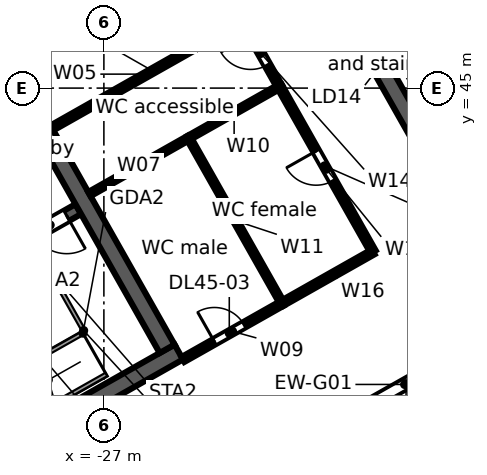
"""IFC4 building model, lengths in metres.
Left out: names, types, materials, properties, quantities, classifications, styles, units other than length and angle.
Written with IfcOpenShell. Run it as: python <this file> out.ifc"""

import sys

from ifc_helpers import new_model, si_unit, direction, frame, frame_2d, origin, place, context, subcontext, project, spatial, rectangle, extrude, element, fill, save


model = new_model("IFC4")
c1 = context("Model", 3, precision=1e-05, world=origin(), true_north=direction((0.0, 1.0)))
c2 = subcontext(c1, "Body", "Model", "MODEL_VIEW")
j1 = project(units=[si_unit("LENGTHUNIT", "METRE"), si_unit("PLANEANGLEUNIT", "RADIAN")], contexts=[c1])
p1 = place(None, origin())
s1 = spatial("IfcSite", under=j1, at=p1, CompositionType="ELEMENT")
p2 = place(p1, origin())
s2 = spatial("IfcBuilding", under=s1, at=p2, CompositionType="ELEMENT")
p3 = place(p2, frame((0.0, 0.0, 211.4)))
s3 = spatial("IfcBuildingStorey", under=s2, at=p3, CompositionType="ELEMENT", Elevation=211.4)
p4 = place(p3, frame((-0.046, 47.974, 0.0), z_axis=(0.0, 0.0, 1.0), x_axis=(-0.870356579543, -0.492421998337, 0.0)))
e1 = element("IfcWall", 1, at=p4, inside=s3, PredefinedType="STANDARD", context=c2, shape_type="SweptSolid", body=[
    extrude(rectangle(XDim=43.754, YDim=0.25, at=frame_2d((21.877, 0.0))), origin(), (0.0, 0.0, 1.0), 3.62),
])
p5 = place(p4, frame((41.061, 0.0, 0.8)))
e2 = element("IfcOpeningElement", 2, at=p5, cuts=e1, PredefinedType="OPENING", context=c2, shape_type="SweptSolid", body=[
    extrude(rectangle(XDim=2.4, YDim=2.2, at=frame_2d((1.2, 1.1))), frame((0.0, 0.135, 0.0), z_axis=(0.0, -1.0, 0.0), x_axis=(1.0, 0.0, 0.0)), (0.0, 0.0, 1.0), 0.27),
])
p6 = place(p4, frame((38.443, 0.0, 0.0)))
e3 = element("IfcOpeningElement", 3, at=p6, cuts=e1, PredefinedType="OPENING", context=c2, shape_type="SweptSolid", body=[
    extrude(rectangle(XDim=1.8, YDim=2.4, at=frame_2d((0.9, 1.2))), frame((0.0, 0.135, 0.0), z_axis=(0.0, -1.0, 0.0), x_axis=(1.0, 0.0, 0.0)), (0.0, 0.0, 1.0), 0.27),
])
p7 = place(p4, frame((35.225, 0.0, 0.8)))
e4 = element("IfcOpeningElement", 4, at=p7, cuts=e1, PredefinedType="OPENING", context=c2, shape_type="SweptSolid", body=[
    extrude(rectangle(XDim=2.4, YDim=2.2, at=frame_2d((1.2, 1.1))), frame((0.0, 0.135, 0.0), z_axis=(0.0, -1.0, 0.0), x_axis=(1.0, 0.0, 0.0)), (0.0, 0.0, 1.0), 0.27),
])
p8 = place(p4, frame((32.307, 0.0, 0.8)))
e5 = element("IfcOpeningElement", 5, at=p8, cuts=e1, PredefinedType="OPENING", context=c2, shape_type="SweptSolid", body=[
    extrude(rectangle(XDim=2.4, YDim=2.2, at=frame_2d((1.2, 1.1))), frame((0.0, 0.135, 0.0), z_axis=(0.0, -1.0, 0.0), x_axis=(1.0, 0.0, 0.0)), (0.0, 0.0, 1.0), 0.27),
])
p9 = place(p4, frame((29.688, 0.0, 0.0)))
e6 = element("IfcOpeningElement", 6, at=p9, cuts=e1, PredefinedType="OPENING", context=c2, shape_type="SweptSolid", body=[
    extrude(rectangle(XDim=1.8, YDim=2.4, at=frame_2d((0.9, 1.2))), frame((0.0, 0.135, 0.0), z_axis=(0.0, -1.0, 0.0), x_axis=(1.0, 0.0, 0.0)), (0.0, 0.0, 1.0), 0.27),
])
p10 = place(p4, frame((26.47, 0.0, 0.8)))
e7 = element("IfcOpeningElement", 7, at=p10, cuts=e1, PredefinedType="OPENING", context=c2, shape_type="SweptSolid", body=[
    extrude(rectangle(XDim=2.4, YDim=2.2, at=frame_2d((1.2, 1.1))), frame((0.0, 0.135, 0.0), z_axis=(0.0, -1.0, 0.0), x_axis=(1.0, 0.0, 0.0)), (0.0, 0.0, 1.0), 0.27),
])
p11 = place(p4, frame((23.552, 0.0, 0.8)))
e8 = element("IfcOpeningElement", 8, at=p11, cuts=e1, PredefinedType="OPENING", context=c2, shape_type="SweptSolid", body=[
    extrude(rectangle(XDim=2.4, YDim=2.2, at=frame_2d((1.2, 1.1))), frame((0.0, 0.135, 0.0), z_axis=(0.0, -1.0, 0.0), x_axis=(1.0, 0.0, 0.0)), (0.0, 0.0, 1.0), 0.27),
])
p12 = place(p4, frame((20.934, 0.0, 0.0)))
e9 = element("IfcOpeningElement", 9, at=p12, cuts=e1, PredefinedType="OPENING", context=c2, shape_type="SweptSolid", body=[
    extrude(rectangle(XDim=1.8, YDim=2.4, at=frame_2d((0.9, 1.2))), frame((0.0, 0.135, 0.0), z_axis=(0.0, -1.0, 0.0), x_axis=(1.0, 0.0, 0.0)), (0.0, 0.0, 1.0), 0.27),
])
p13 = place(p4, frame((17.716, 0.0, 0.8)))
e10 = element("IfcOpeningElement", 10, at=p13, cuts=e1, PredefinedType="OPENING", context=c2, shape_type="SweptSolid", body=[
    extrude(rectangle(XDim=2.4, YDim=2.2, at=frame_2d((1.2, 1.1))), frame((0.0, 0.135, 0.0), z_axis=(0.0, -1.0, 0.0), x_axis=(1.0, 0.0, 0.0)), (0.0, 0.0, 1.0), 0.27),
])
p14 = place(p4, frame((14.798, 0.0, 0.8)))
e11 = element("IfcOpeningElement", 11, at=p14, cuts=e1, PredefinedType="OPENING", context=c2, shape_type="SweptSolid", body=[
    extrude(rectangle(XDim=2.4, YDim=2.2, at=frame_2d((1.2, 1.1))), frame((0.0, 0.135, 0.0), z_axis=(0.0, -1.0, 0.0), x_axis=(1.0, 0.0, 0.0)), (0.0, 0.0, 1.0), 0.27),
])
p15 = place(p4, frame((12.179, 0.0, 0.0)))
e12 = element("IfcOpeningElement", 12, at=p15, cuts=e1, PredefinedType="OPENING", context=c2, shape_type="SweptSolid", body=[
    extrude(rectangle(XDim=1.8, YDim=2.4, at=frame_2d((0.9, 1.2))), frame((0.0, 0.135, 0.0), z_axis=(0.0, -1.0, 0.0), x_axis=(1.0, 0.0, 0.0)), (0.0, 0.0, 1.0), 0.27),
])
p16 = place(p4, frame((8.961, 0.0, 0.8)))
e13 = element("IfcOpeningElement", 13, at=p16, cuts=e1, PredefinedType="OPENING", context=c2, shape_type="SweptSolid", body=[
    extrude(rectangle(XDim=2.4, YDim=2.2, at=frame_2d((1.2, 1.1))), frame((0.0, 0.135, 0.0), z_axis=(0.0, -1.0, 0.0), x_axis=(1.0, 0.0, 0.0)), (0.0, 0.0, 1.0), 0.27),
])
p17 = place(p4, frame((6.043, 0.0, 0.8)))
e14 = element("IfcOpeningElement", 14, at=p17, cuts=e1, PredefinedType="OPENING", context=c2, shape_type="SweptSolid", body=[
    extrude(rectangle(XDim=2.4, YDim=2.2, at=frame_2d((1.2, 1.1))), frame((0.0, 0.135, 0.0), z_axis=(0.0, -1.0, 0.0), x_axis=(1.0, 0.0, 0.0)), (0.0, 0.0, 1.0), 0.27),
])
p18 = place(p4, frame((3.425, 0.0, 0.0)))
e15 = element("IfcOpeningElement", 15, at=p18, cuts=e1, PredefinedType="OPENING", context=c2, shape_type="SweptSolid", body=[
    extrude(rectangle(XDim=1.8, YDim=2.4, at=frame_2d((0.9, 1.2))), frame((0.0, 0.135, 0.0), z_axis=(0.0, -1.0, 0.0), x_axis=(1.0, 0.0, 0.0)), (0.0, 0.0, 1.0), 0.27),
])
p19 = place(p4, frame((0.207, 0.0, 0.8)))
e16 = element("IfcOpeningElement", 16, at=p19, cuts=e1, PredefinedType="OPENING", context=c2, shape_type="SweptSolid", body=[
    extrude(rectangle(XDim=2.4, YDim=2.2, at=frame_2d((1.2, 1.1))), frame((0.0, 0.135, 0.0), z_axis=(0.0, -1.0, 0.0), x_axis=(1.0, 0.0, 0.0)), (0.0, 0.0, 1.0), 0.27),
])
p20 = place(p3, frame((-58.732, 38.771, 0.0), z_axis=(0.0, 0.0, 1.0), x_axis=(0.870354824205, 0.492425100887, 0.0)))
e17 = element("IfcWall", 17, at=p20, inside=s3, PredefinedType="STANDARD", context=c2, shape_type="SweptSolid", body=[
    extrude(rectangle(XDim=64.006, YDim=0.25, at=frame_2d((32.003, 0.0))), origin(), (0.0, 0.0, 1.0), 3.62),
])
p21 = place(p20, frame((61.259, 0.0, 0.8)))
e18 = element("IfcOpeningElement", 18, at=p21, cuts=e17, PredefinedType="OPENING", context=c2, shape_type="SweptSolid", body=[
    extrude(rectangle(XDim=2.4, YDim=2.2, at=frame_2d((1.2, 1.1))), frame((0.0, 0.135, 0.0), z_axis=(0.0, -1.0, 0.0), x_axis=(1.0, 0.0, 0.0)), (0.0, 0.0, 1.0), 0.27),
])
p22 = place(p20, frame((58.216, 0.0, 0.8)))
e19 = element("IfcOpeningElement", 19, at=p22, cuts=e17, PredefinedType="OPENING", context=c2, shape_type="SweptSolid", body=[
    extrude(rectangle(XDim=2.4, YDim=2.2, at=frame_2d((1.2, 1.1))), frame((0.0, 0.135, 0.0), z_axis=(0.0, -1.0, 0.0), x_axis=(1.0, 0.0, 0.0)), (0.0, 0.0, 1.0), 0.27),
])
p23 = place(p20, frame((55.173, 0.0, 0.8)))
e20 = element("IfcOpeningElement", 20, at=p23, cuts=e17, PredefinedType="OPENING", context=c2, shape_type="SweptSolid", body=[
    extrude(rectangle(XDim=2.4, YDim=2.2, at=frame_2d((1.2, 1.1))), frame((0.0, 0.135, 0.0), z_axis=(0.0, -1.0, 0.0), x_axis=(1.0, 0.0, 0.0)), (0.0, 0.0, 1.0), 0.27),
])
p24 = place(p20, frame((52.129, 0.0, 0.8)))
e21 = element("IfcOpeningElement", 21, at=p24, cuts=e17, PredefinedType="OPENING", context=c2, shape_type="SweptSolid", body=[
    extrude(rectangle(XDim=2.4, YDim=2.2, at=frame_2d((1.2, 1.1))), frame((0.0, 0.135, 0.0), z_axis=(0.0, -1.0, 0.0), x_axis=(1.0, 0.0, 0.0)), (0.0, 0.0, 1.0), 0.27),
])
p25 = place(p20, frame((49.086, 0.0, 0.8)))
e22 = element("IfcOpeningElement", 22, at=p25, cuts=e17, PredefinedType="OPENING", context=c2, shape_type="SweptSolid", body=[
    extrude(rectangle(XDim=2.4, YDim=2.2, at=frame_2d((1.2, 1.1))), frame((0.0, 0.135, 0.0), z_axis=(0.0, -1.0, 0.0), x_axis=(1.0, 0.0, 0.0)), (0.0, 0.0, 1.0), 0.27),
])
p26 = place(p20, frame((46.043, 0.0, 0.8)))
e23 = element("IfcOpeningElement", 23, at=p26, cuts=e17, PredefinedType="OPENING", context=c2, shape_type="SweptSolid", body=[
    extrude(rectangle(XDim=2.4, YDim=2.2, at=frame_2d((1.2, 1.1))), frame((0.0, 0.135, 0.0), z_axis=(0.0, -1.0, 0.0), x_axis=(1.0, 0.0, 0.0)), (0.0, 0.0, 1.0), 0.27),
])
p27 = place(p20, frame((43.0, 0.0, 0.8)))
e24 = element("IfcOpeningElement", 24, at=p27, cuts=e17, PredefinedType="OPENING", context=c2, shape_type="SweptSolid", body=[
    extrude(rectangle(XDim=2.4, YDim=2.2, at=frame_2d((1.2, 1.1))), frame((0.0, 0.135, 0.0), z_axis=(0.0, -1.0, 0.0), x_axis=(1.0, 0.0, 0.0)), (0.0, 0.0, 1.0), 0.27),
])
p28 = place(p20, frame((39.956, 0.0, 0.8)))
e25 = element("IfcOpeningElement", 25, at=p28, cuts=e17, PredefinedType="OPENING", context=c2, shape_type="SweptSolid", body=[
    extrude(rectangle(XDim=2.4, YDim=2.2, at=frame_2d((1.2, 1.1))), frame((0.0, 0.135, 0.0), z_axis=(0.0, -1.0, 0.0), x_axis=(1.0, 0.0, 0.0)), (0.0, 0.0, 1.0), 0.27),
])
p29 = place(p20, frame((36.913, 0.0, 0.8)))
e26 = element("IfcOpeningElement", 26, at=p29, cuts=e17, PredefinedType="OPENING", context=c2, shape_type="SweptSolid", body=[
    extrude(rectangle(XDim=2.4, YDim=2.2, at=frame_2d((1.2, 1.1))), frame((0.0, 0.135, 0.0), z_axis=(0.0, -1.0, 0.0), x_axis=(1.0, 0.0, 0.0)), (0.0, 0.0, 1.0), 0.27),
])
p30 = place(p20, frame((33.87, 0.0, 0.8)))
e27 = element("IfcOpeningElement", 27, at=p30, cuts=e17, PredefinedType="OPENING", context=c2, shape_type="SweptSolid", body=[
    extrude(rectangle(XDim=2.4, YDim=2.2, at=frame_2d((1.2, 1.1))), frame((0.0, 0.135, 0.0), z_axis=(0.0, -1.0, 0.0), x_axis=(1.0, 0.0, 0.0)), (0.0, 0.0, 1.0), 0.27),
])
p31 = place(p20, frame((30.826, 0.0, 0.8)))
e28 = element("IfcOpeningElement", 28, at=p31, cuts=e17, PredefinedType="OPENING", context=c2, shape_type="SweptSolid", body=[
    extrude(rectangle(XDim=2.4, YDim=2.2, at=frame_2d((1.2, 1.1))), frame((0.0, 0.135, 0.0), z_axis=(0.0, -1.0, 0.0), x_axis=(1.0, 0.0, 0.0)), (0.0, 0.0, 1.0), 0.27),
])
p32 = place(p20, frame((27.783, 0.0, 0.8)))
e29 = element("IfcOpeningElement", 29, at=p32, cuts=e17, PredefinedType="OPENING", context=c2, shape_type="SweptSolid", body=[
    extrude(rectangle(XDim=2.4, YDim=2.2, at=frame_2d((1.2, 1.1))), frame((0.0, 0.135, 0.0), z_axis=(0.0, -1.0, 0.0), x_axis=(1.0, 0.0, 0.0)), (0.0, 0.0, 1.0), 0.27),
])
p33 = place(p20, frame((24.74, 0.0, 0.8)))
e30 = element("IfcOpeningElement", 30, at=p33, cuts=e17, PredefinedType="OPENING", context=c2, shape_type="SweptSolid", body=[
    extrude(rectangle(XDim=2.4, YDim=2.2, at=frame_2d((1.2, 1.1))), frame((0.0, 0.135, 0.0), z_axis=(0.0, -1.0, 0.0), x_axis=(1.0, 0.0, 0.0)), (0.0, 0.0, 1.0), 0.27),
])
p34 = place(p20, frame((21.696, 0.0, 0.8)))
e31 = element("IfcOpeningElement", 31, at=p34, cuts=e17, PredefinedType="OPENING", context=c2, shape_type="SweptSolid", body=[
    extrude(rectangle(XDim=2.4, YDim=2.2, at=frame_2d((1.2, 1.1))), frame((0.0, 0.135, 0.0), z_axis=(0.0, -1.0, 0.0), x_axis=(1.0, 0.0, 0.0)), (0.0, 0.0, 1.0), 0.27),
])
p35 = place(p20, frame((18.653, 0.0, 0.8)))
e32 = element("IfcOpeningElement", 32, at=p35, cuts=e17, PredefinedType="OPENING", context=c2, shape_type="SweptSolid", body=[
    extrude(rectangle(XDim=2.4, YDim=2.2, at=frame_2d((1.2, 1.1))), frame((0.0, 0.135, 0.0), z_axis=(0.0, -1.0, 0.0), x_axis=(1.0, 0.0, 0.0)), (0.0, 0.0, 1.0), 0.27),
])
p36 = place(p20, frame((15.61, 0.0, 0.8)))
e33 = element("IfcOpeningElement", 33, at=p36, cuts=e17, PredefinedType="OPENING", context=c2, shape_type="SweptSolid", body=[
    extrude(rectangle(XDim=2.4, YDim=2.2, at=frame_2d((1.2, 1.1))), frame((0.0, 0.135, 0.0), z_axis=(0.0, -1.0, 0.0), x_axis=(1.0, 0.0, 0.0)), (0.0, 0.0, 1.0), 0.27),
])
p37 = place(p20, frame((12.567, 0.0, 0.8)))
e34 = element("IfcOpeningElement", 34, at=p37, cuts=e17, PredefinedType="OPENING", context=c2, shape_type="SweptSolid", body=[
    extrude(rectangle(XDim=2.4, YDim=2.2, at=frame_2d((1.2, 1.1))), frame((0.0, 0.135, 0.0), z_axis=(0.0, -1.0, 0.0), x_axis=(1.0, 0.0, 0.0)), (0.0, 0.0, 1.0), 0.27),
])
p38 = place(p20, frame((9.523, 0.0, 0.8)))
e35 = element("IfcOpeningElement", 35, at=p38, cuts=e17, PredefinedType="OPENING", context=c2, shape_type="SweptSolid", body=[
    extrude(rectangle(XDim=2.4, YDim=2.2, at=frame_2d((1.2, 1.1))), frame((0.0, 0.135, 0.0), z_axis=(0.0, -1.0, 0.0), x_axis=(1.0, 0.0, 0.0)), (0.0, 0.0, 1.0), 0.27),
])
p39 = place(p20, frame((6.48, 0.0, 0.8)))
e36 = element("IfcOpeningElement", 36, at=p39, cuts=e17, PredefinedType="OPENING", context=c2, shape_type="SweptSolid", body=[
    extrude(rectangle(XDim=2.4, YDim=2.2, at=frame_2d((1.2, 1.1))), frame((0.0, 0.135, 0.0), z_axis=(0.0, -1.0, 0.0), x_axis=(1.0, 0.0, 0.0)), (0.0, 0.0, 1.0), 0.27),
])
p40 = place(p20, frame((3.437, 0.0, 0.8)))
e37 = element("IfcOpeningElement", 37, at=p40, cuts=e17, PredefinedType="OPENING", context=c2, shape_type="SweptSolid", body=[
    extrude(rectangle(XDim=2.4, YDim=2.2, at=frame_2d((1.2, 1.1))), frame((0.0, 0.135, 0.0), z_axis=(0.0, -1.0, 0.0), x_axis=(1.0, 0.0, 0.0)), (0.0, 0.0, 1.0), 0.27),
])
p41 = place(p20, frame((0.393, 0.0, 0.8)))
e38 = element("IfcOpeningElement", 38, at=p41, cuts=e17, PredefinedType="OPENING", context=c2, shape_type="SweptSolid", body=[
    extrude(rectangle(XDim=2.4, YDim=2.2, at=frame_2d((1.2, 1.1))), frame((0.0, 0.135, 0.0), z_axis=(0.0, -1.0, 0.0), x_axis=(1.0, 0.0, 0.0)), (0.0, 0.0, 1.0), 0.27),
])
p42 = place(p3, frame((-39.825, 29.684, 0.0), z_axis=(0.0, 0.0, 1.0), x_axis=(0.870353598469, 0.492427267353, 0.0)))
e39 = element("IfcWall", 39, at=p42, inside=s3, PredefinedType="SOLIDWALL", context=c2, shape_type="SweptSolid", body=[
    extrude(rectangle(XDim=17.0, YDim=0.45, at=frame_2d((8.5, 0.0))), origin(), (0.0, 0.0, 1.0), 3.62),
])
p43 = place(p42, frame((7.2, 0.0, 0.0)))
e40 = element("IfcOpeningElement", 40, at=p43, cuts=e39, PredefinedType="OPENING", context=c2, shape_type="SweptSolid", body=[
    extrude(rectangle(XDim=1.2, YDim=2.1, at=frame_2d((0.6, 1.05))), frame((0.0, 0.235, 0.0), z_axis=(0.0, -1.0, 0.0), x_axis=(1.0, 0.0, 0.0)), (0.0, 0.0, 1.0), 0.47),
])
p44 = place(p3, frame((-34.245, 38.097, 0.0), z_axis=(0.0, 0.0, 1.0), x_axis=(0.870360409231, 0.492415229297, 0.0)))
e41 = element("IfcWall", 41, at=p44, inside=s3, PredefinedType="SOLIDWALL", context=c2, shape_type="SweptSolid", body=[
    extrude(rectangle(XDim=7.55, YDim=0.3, at=frame_2d((3.775, 0.0))), origin(), (0.0, 0.0, 1.0), 3.62),
])
p45 = place(p44, frame((6.2, 0.0, 0.0)))
e42 = element("IfcOpeningElement", 42, at=p45, cuts=e41, PredefinedType="OPENING", context=c2, shape_type="SweptSolid", body=[
    extrude(rectangle(XDim=1.0, YDim=2.1, at=frame_2d((0.5, 1.05))), frame((0.0, 0.16, 0.0), z_axis=(0.0, -1.0, 0.0), x_axis=(1.0, 0.0, 0.0)), (0.0, 0.0, 1.0), 0.32),
])
p46 = place(p3, frame((-31.787, 49.542, 0.0), z_axis=(0.0, 0.0, 1.0), x_axis=(0.492421378713, -0.870356930107, 0.0)))
e43 = element("IfcWall", 43, at=p46, inside=s3, PredefinedType="SOLIDWALL", context=c2, shape_type="SweptSolid", body=[
    extrude(rectangle(XDim=13.1, YDim=0.45, at=frame_2d((6.55, 0.0))), origin(), (0.0, 0.0, 1.0), 3.62),
])
p47 = place(p3, frame((-24.353, 53.747, 0.0), z_axis=(0.0, 0.0, 1.0), x_axis=(0.492435496286, -0.870348942665, 0.0)))
e44 = element("IfcWall", 44, at=p47, inside=s3, PredefinedType="SOLIDWALL", context=c2, shape_type="SweptSolid", body=[
    extrude(rectangle(XDim=13.1, YDim=0.45, at=frame_2d((6.55, 0.0))), origin(), (0.0, 0.0, 1.0), 3.62),
])
p48 = place(p3, frame((-29.35, 45.692, 0.0), z_axis=(0.0, 0.0, 1.0), x_axis=(0.870294630003, 0.492531478169, 0.0)))
e45 = element("IfcWall", 45, at=p48, inside=s3, PredefinedType="PARTITIONING", context=c2, shape_type="SweptSolid", body=[
    extrude(rectangle(XDim=5.75, YDim=0.125, at=frame_2d((2.875, 0.0))), origin(), (0.0, 0.0, 1.0), 3.62),
])
p49 = place(p3, frame((-28.366, 43.952, 0.0), z_axis=(0.0, 0.0, 1.0), x_axis=(0.870398309195, 0.492348233825, 0.0)))
e46 = element("IfcWall", 46, at=p49, inside=s3, PredefinedType="PARTITIONING", context=c2, shape_type="SweptSolid", body=[
    extrude(rectangle(XDim=5.75, YDim=0.15, at=frame_2d((2.875, 0.0))), origin(), (0.0, 0.0, 1.0), 2.892),
])
p50 = place(p3, frame((-27.381, 42.211, 0.0), z_axis=(0.0, 0.0, 1.0), x_axis=(0.870388475779, 0.492365617434, 0.0)))
e47 = element("IfcWall", 47, at=p50, inside=s3, PredefinedType="PARTITIONING", context=c2, shape_type="SweptSolid", body=[
    extrude(rectangle(XDim=3.0, YDim=0.125, at=frame_2d((1.5, 0.0))), origin(), (0.0, 0.0, 1.0), 2.892),
])
p51 = place(p3, frame((-24.919, 37.859, 0.0), z_axis=(0.0, 0.0, 1.0), x_axis=(0.870368744559, 0.492400496034, 0.0)))
e48 = element("IfcWall", 48, at=p51, inside=s3, PredefinedType="PARTITIONING", context=c2, shape_type="SweptSolid", body=[
    extrude(rectangle(XDim=3.0, YDim=0.15, at=frame_2d((1.5, 0.0))), origin(), (0.0, 0.0, 1.0), 2.892),
])
p52 = place(p51, frame((0.95, 0.0, 0.0)))
e49 = element("IfcOpeningElement", 49, at=p52, cuts=e48, PredefinedType="OPENING", context=c2, shape_type="SweptSolid", body=[
    extrude(rectangle(XDim=0.9, YDim=2.1, at=frame_2d((0.45, 1.05))), frame((0.0, 0.085, 0.0), z_axis=(0.0, -1.0, 0.0), x_axis=(1.0, 0.0, 0.0)), (0.0, 0.0, 1.0), 0.17),
])
p53 = place(p3, frame((-24.77, 43.688, 0.0), z_axis=(0.0, 0.0, 1.0), x_axis=(0.870430549821, 0.492291232848, 0.0)))
e50 = element("IfcWall", 50, at=p53, inside=s3, PredefinedType="PARTITIONING", context=c2, shape_type="SweptSolid", body=[
    extrude(rectangle(XDim=2.75, YDim=0.125, at=frame_2d((1.375, 0.0))), origin(), (0.0, 0.0, 1.0), 3.62),
])
p54 = place(p3, frame((-24.77, 43.688, 0.0), z_axis=(0.0, 0.0, 1.0), x_axis=(0.492369352746, -0.870386362759, 0.0)))
e51 = element("IfcWall", 51, at=p54, inside=s3, PredefinedType="PARTITIONING", context=c2, shape_type="SweptSolid", body=[
    extrude(rectangle(XDim=5.0, YDim=0.125, at=frame_2d((2.5, 0.0))), origin(), (0.0, 0.0, 1.0), 3.62),
])
p55 = place(p3, frame((-23.361, 46.783, 0.0), z_axis=(0.0, 0.0, 1.0), x_axis=(0.492467412326, -0.870330884088, 0.0)))
e52 = element("IfcWall", 52, at=p55, inside=s3, PredefinedType="PARTITIONING", context=c2, shape_type="SweptSolid", body=[
    extrude(rectangle(XDim=2.0, YDim=0.15, at=frame_2d((1.0, 0.0))), origin(), (0.0, 0.0, 1.0), 2.892),
])
p56 = place(p55, frame((0.45, 0.0, 0.0)))
e53 = element("IfcOpeningElement", 53, at=p56, cuts=e52, PredefinedType="OPENING", context=c2, shape_type="SweptSolid", body=[
    extrude(rectangle(XDim=0.9, YDim=2.1, at=frame_2d((0.45, 1.05))), frame((0.0, 0.085, 0.0), z_axis=(0.0, -1.0, 0.0), x_axis=(1.0, 0.0, 0.0)), (0.0, 0.0, 1.0), 0.17),
])
p57 = place(p3, frame((-22.376, 45.042, 0.0), z_axis=(0.0, 0.0, 1.0), x_axis=(0.49245306389, -0.870339002841, 0.0)))
e54 = element("IfcWall", 54, at=p57, inside=s3, PredefinedType="PARTITIONING", context=c2, shape_type="SweptSolid", body=[
    extrude(rectangle(XDim=4.999, YDim=0.15, at=frame_2d((2.5, 0.0))), origin(), (0.0, 0.0, 1.0), 3.62),
])
p58 = place(p57, frame((1.95, 0.0, 0.0)))
e55 = element("IfcOpeningElement", 55, at=p58, cuts=e54, PredefinedType="OPENING", context=c2, shape_type="SweptSolid", body=[
    extrude(rectangle(XDim=0.9, YDim=2.1, at=frame_2d((0.45, 1.05))), frame((0.0, 0.085, 0.0), z_axis=(0.0, -1.0, 0.0), x_axis=(1.0, 0.0, 0.0)), (0.0, 0.0, 1.0), 0.17),
])
p59 = place(p3, frame((-22.308, 39.336, 0.0), z_axis=(0.0, 0.0, 1.0), x_axis=(0.870278389592, 0.492560173591, 0.0)))
e56 = element("IfcWall", 56, at=p59, inside=s3, PredefinedType="PARTITIONING", context=c2, shape_type="SweptSolid", body=[
    extrude(rectangle(XDim=2.751, YDim=0.15, at=frame_2d((1.375, 0.0))), origin(), (0.0, 0.0, 1.0), 3.62),
])
p60 = place(p12, origin())
e57 = element("IfcDoor", 57, at=p60, inside=s3, OperationType="DOUBLE_DOOR_SINGLE_SWING", PredefinedType="DOOR", context=c2, shape_type="SweptSolid", body=[
    extrude(rectangle(XDim=1.8, YDim=2.4, at=frame_2d((0.9, 1.2))), frame((0.0, 0.025, 0.0), z_axis=(0.0, -1.0, 0.0), x_axis=(1.0, 0.0, 0.0)), (0.0, 0.0, 1.0), 0.05),
])
fill(e9, e57)
p61 = place(p45, frame((1.0, 0.0, 0.0), z_axis=(0.0, 0.0, 1.0), x_axis=(-1.0, 0.0, 0.0)))
e58 = element("IfcDoor", 58, at=p61, inside=s3, OperationType="SINGLE_SWING_LEFT", PredefinedType="DOOR", context=c2, shape_type="SweptSolid", body=[
    extrude(rectangle(XDim=1.0, YDim=2.1, at=frame_2d((0.5, 1.05))), frame((0.0, 0.025, 0.0), z_axis=(0.0, -1.0, 0.0), x_axis=(1.0, 0.0, 0.0)), (0.0, 0.0, 1.0), 0.05),
])
fill(e42, e58)
p62 = place(p52, origin())
e59 = element("IfcDoor", 59, at=p62, inside=s3, OperationType="SINGLE_SWING_LEFT", PredefinedType="DOOR", context=c2, shape_type="SweptSolid", body=[
    extrude(rectangle(XDim=0.9, YDim=2.1, at=frame_2d((0.45, 1.05))), frame((0.0, 0.025, 0.0), z_axis=(0.0, -1.0, 0.0), x_axis=(1.0, 0.0, 0.0)), (0.0, 0.0, 1.0), 0.05),
])
fill(e49, e59)
p63 = place(p58, frame((0.9, 0.0, 0.0), z_axis=(0.0, 0.0, 1.0), x_axis=(-1.0, 0.0, 0.0)))
e60 = element("IfcDoor", 60, at=p63, inside=s3, OperationType="SINGLE_SWING_RIGHT", PredefinedType="DOOR", context=c2, shape_type="SweptSolid", body=[
    extrude(rectangle(XDim=0.9, YDim=2.1, at=frame_2d((0.45, 1.05))), frame((0.0, 0.025, 0.0), z_axis=(0.0, -1.0, 0.0), x_axis=(1.0, 0.0, 0.0)), (0.0, 0.0, 1.0), 0.05),
])
fill(e55, e60)
p64 = place(p56, frame((0.9, 0.0, 0.0), z_axis=(0.0, 0.0, 1.0), x_axis=(-1.0, 0.0, 0.0)))
e61 = element("IfcDoor", 61, at=p64, inside=s3, OperationType="SINGLE_SWING_RIGHT", PredefinedType="DOOR", context=c2, shape_type="SweptSolid", body=[
    extrude(rectangle(XDim=0.9, YDim=2.1, at=frame_2d((0.45, 1.05))), frame((0.0, 0.025, 0.0), z_axis=(0.0, -1.0, 0.0), x_axis=(1.0, 0.0, 0.0)), (0.0, 0.0, 1.0), 0.05),
])
fill(e53, e61)
save(model, sys.argv[1])
